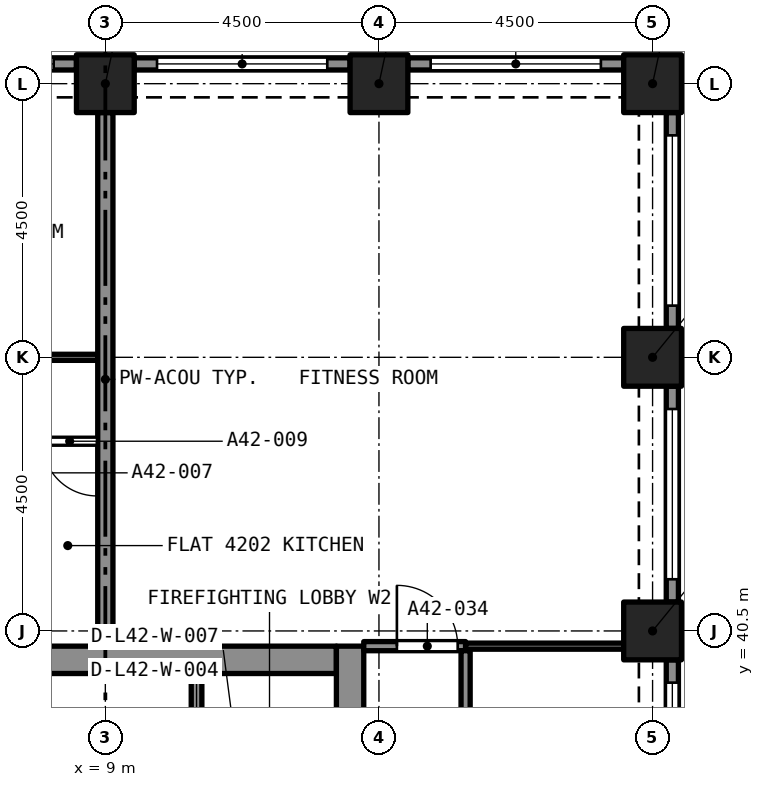
"""IFC4 building model, lengths in metres.
Left out: names, types, materials, properties, quantities, classifications, styles, units other than length and angle.
Written with IfcOpenShell. Run it as: python <this file> out.ifc"""

import sys

from ifc_helpers import new_model, si_unit, direction, frame, frame_2d, origin, origin_2d, place, context, subcontext, project, spatial, rectangle, extrude, element, fill, save


model = new_model("IFC4")
c1 = context("Model", 3, precision=1e-05, world=origin(), true_north=direction((0.0, 1.0)))
c2 = subcontext(c1, "Body", "Model", "MODEL_VIEW")
j1 = project(units=[si_unit("LENGTHUNIT", "METRE"), si_unit("PLANEANGLEUNIT", "RADIAN")], contexts=[c1])
p1 = place(None, origin())
s1 = spatial("IfcSite", under=j1, at=p1, CompositionType="ELEMENT")
p2 = place(p1, origin())
s2 = spatial("IfcBuilding", under=s1, at=p2, CompositionType="ELEMENT")
p3 = place(p2, frame((0.0, 0.0, 150.6)))
s3 = spatial("IfcBuildingStorey", under=s2, at=p3, CompositionType="ELEMENT", Elevation=150.6)
for number, where, z_axis, x_axis in (
    (1, (18.0, 40.5, 0.0), (0.0, 0.0, 1.0), (1.0, 0.0, 0.0)),
    (2, (18.0, 45.0, 0.0), (0.0, 0.0, 1.0), (1.0, 0.0, 0.0)),
    (3, (9.0, 49.5, 0.0), (0.0, 0.0, 1.0), (1.0, 0.0, 0.0)),
    (4, (13.5, 49.5, 0.0), (0.0, 0.0, 1.0), (1.0, 0.0, 0.0)),
    (5, (18.0, 49.5, 0.0), (0.0, 0.0, 1.0), (1.0, 0.0, 0.0)),
):
    element("IfcColumn", number, at=place(p3, frame(where, z_axis=z_axis, x_axis=x_axis)), inside=s3, PredefinedType="COLUMN", context=c2, shape_type="SweptSolid", body=[
        extrude(rectangle(XDim=0.95, YDim=0.95, at=origin_2d()), origin(), (0.0, 0.0, 1.0), 4.4),
    ])
p4 = place(p3, frame((5.2, 40.025, 0.0), z_axis=(0.0, 0.0, 1.0), x_axis=(1.0, 0.0, 0.0)))
e6 = element("IfcWall", 6, at=p4, inside=s3, PredefinedType="SOLIDWALL", context=c2, shape_type="SweptSolid", body=[
    extrude(rectangle(XDim=7.6, YDim=0.45, at=frame_2d((3.8, 0.0))), origin(), (0.0, 0.0, 1.0), 4.4),
])
p5 = place(p3, frame((13.025, 27.25, 0.0), z_axis=(0.0, 0.0, 1.0), x_axis=(0.0, 1.0, 0.0)))
e7 = element("IfcWall", 7, at=p5, inside=s3, PredefinedType="SOLIDWALL", context=c2, shape_type="SweptSolid", body=[
    extrude(rectangle(XDim=13.0, YDim=0.45, at=frame_2d((6.5, 0.0))), origin(), (0.0, 0.0, 1.0), 4.4),
])
p6 = place(p5, frame((10.85, 0.0, 0.0)))
e8 = element("IfcOpeningElement", 8, at=p6, cuts=e7, PredefinedType="OPENING", context=c2, shape_type="SweptSolid", body=[
    extrude(rectangle(XDim=1.1, YDim=2.1, at=frame_2d((0.55, 1.05))), frame((0.0, 0.235, 0.0), z_axis=(0.0, -1.0, 0.0), x_axis=(1.0, 0.0, 0.0)), (0.0, 0.0, 1.0), 0.47),
])
p7 = place(p5, frame((8.7, 0.0, 0.0)))
e9 = element("IfcOpeningElement", 9, at=p7, cuts=e7, PredefinedType="OPENING", context=c2, shape_type="SweptSolid", body=[
    extrude(rectangle(XDim=1.2, YDim=2.1, at=frame_2d((0.6, 1.05))), frame((0.0, 0.235, 0.0), z_axis=(0.0, -1.0, 0.0), x_axis=(1.0, 0.0, 0.0)), (0.0, 0.0, 1.0), 0.47),
])
p8 = place(p3, frame((13.975, 49.825, 0.0), z_axis=(0.0, 0.0, 1.0), x_axis=(1.0, 0.0, 0.0)))
e10 = element("IfcWall", 10, at=p8, inside=s3, PredefinedType="SOLIDWALL", context=c2, shape_type="SweptSolid", body=[
    extrude(rectangle(XDim=3.55, YDim=0.2, at=frame_2d((1.775, 0.0))), origin(), (0.0, 0.0, 1.0), 4.4),
])
p9 = place(p8, frame((0.375, 0.0, 0.45)))
e11 = element("IfcOpeningElement", 11, at=p9, cuts=e10, PredefinedType="OPENING", context=c2, shape_type="SweptSolid", body=[
    extrude(rectangle(XDim=2.8, YDim=2.55, at=frame_2d((1.4, 1.275))), frame((0.0, 0.11, 0.0), z_axis=(0.0, -1.0, 0.0), x_axis=(1.0, 0.0, 0.0)), (0.0, 0.0, 1.0), 0.22),
])
p10 = place(p3, frame((9.475, 49.825, 0.0), z_axis=(0.0, 0.0, 1.0), x_axis=(1.0, 0.0, 0.0)))
e12 = element("IfcWall", 12, at=p10, inside=s3, PredefinedType="SOLIDWALL", context=c2, shape_type="SweptSolid", body=[
    extrude(rectangle(XDim=3.55, YDim=0.2, at=frame_2d((1.775, 0.0))), origin(), (0.0, 0.0, 1.0), 4.4),
])
p11 = place(p10, frame((0.375, 0.0, 0.45)))
e13 = element("IfcOpeningElement", 13, at=p11, cuts=e12, PredefinedType="OPENING", context=c2, shape_type="SweptSolid", body=[
    extrude(rectangle(XDim=2.8, YDim=2.55, at=frame_2d((1.4, 1.275))), frame((0.0, 0.11, 0.0), z_axis=(0.0, -1.0, 0.0), x_axis=(1.0, 0.0, 0.0)), (0.0, 0.0, 1.0), 0.22),
])
p12 = place(p3, frame((4.975, 49.825, 0.0), z_axis=(0.0, 0.0, 1.0), x_axis=(1.0, 0.0, 0.0)))
e14 = element("IfcWall", 14, at=p12, inside=s3, PredefinedType="SOLIDWALL", context=c2, shape_type="SweptSolid", body=[
    extrude(rectangle(XDim=3.55, YDim=0.2, at=frame_2d((1.775, 0.0))), origin(), (0.0, 0.0, 1.0), 4.4),
])
p13 = place(p12, frame((0.375, 0.0, 0.45)))
e15 = element("IfcOpeningElement", 15, at=p13, cuts=e14, PredefinedType="OPENING", context=c2, shape_type="SweptSolid", body=[
    extrude(rectangle(XDim=2.8, YDim=2.55, at=frame_2d((1.4, 1.275))), frame((0.0, 0.11, 0.0), z_axis=(0.0, -1.0, 0.0), x_axis=(1.0, 0.0, 0.0)), (0.0, 0.0, 1.0), 0.22),
])
p14 = place(p3, frame((18.325, 40.025, 0.0), z_axis=(0.0, 0.0, 1.0), x_axis=(0.0, -1.0, 0.0)))
e16 = element("IfcWall", 16, at=p14, inside=s3, PredefinedType="SOLIDWALL", context=c2, shape_type="SweptSolid", body=[
    extrude(rectangle(XDim=3.55, YDim=0.2, at=frame_2d((1.775, 0.0))), origin(), (0.0, 0.0, 1.0), 4.4),
])
p15 = place(p14, frame((0.375, 0.0, 0.45)))
e17 = element("IfcOpeningElement", 17, at=p15, cuts=e16, PredefinedType="OPENING", context=c2, shape_type="SweptSolid", body=[
    extrude(rectangle(XDim=2.8, YDim=2.55, at=frame_2d((1.4, 1.275))), frame((0.0, 0.11, 0.0), z_axis=(0.0, -1.0, 0.0), x_axis=(1.0, 0.0, 0.0)), (0.0, 0.0, 1.0), 0.22),
])
p16 = place(p3, frame((18.325, 44.525, 0.0), z_axis=(0.0, 0.0, 1.0), x_axis=(0.0, -1.0, 0.0)))
e18 = element("IfcWall", 18, at=p16, inside=s3, PredefinedType="SOLIDWALL", context=c2, shape_type="SweptSolid", body=[
    extrude(rectangle(XDim=3.55, YDim=0.2, at=frame_2d((1.775, 0.0))), origin(), (0.0, 0.0, 1.0), 4.4),
])
p17 = place(p16, frame((0.375, 0.0, 0.45)))
e19 = element("IfcOpeningElement", 19, at=p17, cuts=e18, PredefinedType="OPENING", context=c2, shape_type="SweptSolid", body=[
    extrude(rectangle(XDim=2.8, YDim=2.55, at=frame_2d((1.4, 1.275))), frame((0.0, 0.11, 0.0), z_axis=(0.0, -1.0, 0.0), x_axis=(1.0, 0.0, 0.0)), (0.0, 0.0, 1.0), 0.22),
])
p18 = place(p3, frame((18.325, 49.025, 0.0), z_axis=(0.0, 0.0, 1.0), x_axis=(0.0, -1.0, 0.0)))
e20 = element("IfcWall", 20, at=p18, inside=s3, PredefinedType="SOLIDWALL", context=c2, shape_type="SweptSolid", body=[
    extrude(rectangle(XDim=3.55, YDim=0.2, at=frame_2d((1.775, 0.0))), origin(), (0.0, 0.0, 1.0), 4.4),
])
p19 = place(p18, frame((0.375, 0.0, 0.45)))
e21 = element("IfcOpeningElement", 21, at=p19, cuts=e20, PredefinedType="OPENING", context=c2, shape_type="SweptSolid", body=[
    extrude(rectangle(XDim=2.8, YDim=2.55, at=frame_2d((1.4, 1.275))), frame((0.0, 0.11, 0.0), z_axis=(0.0, -1.0, 0.0), x_axis=(1.0, 0.0, 0.0)), (0.0, 0.0, 1.0), 0.22),
])
p20 = place(p3, frame((4.5, 45.0, 0.0), z_axis=(0.0, 0.0, 1.0), x_axis=(1.0, 0.0, 0.0)))
e22 = element("IfcWall", 22, at=p20, inside=s3, PredefinedType="PARTITIONING", context=c2, shape_type="SweptSolid", body=[
    extrude(rectangle(XDim=4.375, YDim=0.1, at=frame_2d((2.188, 0.0))), origin(), (0.0, 0.0, 1.0), 4.1),
])
p21 = place(p20, frame((1.8, 0.0, 0.0)))
e23 = element("IfcOpeningElement", 23, at=p21, cuts=e22, PredefinedType="OPENING", context=c2, shape_type="SweptSolid", body=[
    extrude(rectangle(XDim=0.9, YDim=2.1, at=frame_2d((0.45, 1.05))), frame((0.0, 0.06, 0.0), z_axis=(0.0, -1.0, 0.0), x_axis=(1.0, 0.0, 0.0)), (0.0, 0.0, 1.0), 0.12),
])
p22 = place(p3, frame((8.875, 43.62, 0.0), z_axis=(0.0, 0.0, 1.0), x_axis=(-1.0, 0.0, 0.0)))
e24 = element("IfcWall", 24, at=p22, inside=s3, PredefinedType="PARTITIONING", context=c2, shape_type="SweptSolid", body=[
    extrude(rectangle(XDim=1.048, YDim=0.1, at=frame_2d((0.524, 0.0))), origin(), (0.0, 0.0, 1.0), 4.1),
])
p23 = place(p22, frame((0.011, 0.0, 0.0)))
e25 = element("IfcOpeningElement", 25, at=p23, cuts=e24, PredefinedType="OPENING", context=c2, shape_type="SweptSolid", body=[
    extrude(rectangle(XDim=0.9, YDim=2.1, at=frame_2d((0.45, 1.05))), frame((0.0, 0.06, 0.0), z_axis=(0.0, -1.0, 0.0), x_axis=(1.0, 0.0, 0.0)), (0.0, 0.0, 1.0), 0.12),
])
p24 = place(p3, frame((9.0, 40.25, 0.0), z_axis=(0.0, 0.0, 1.0), x_axis=(0.0, 1.0, 0.0)))
e26 = element("IfcWall", 26, at=p24, inside=s3, PredefinedType="PARTITIONING", context=c2, shape_type="SweptSolid", body=[
    extrude(rectangle(XDim=8.775, YDim=0.25, at=frame_2d((4.387, 0.0))), origin(), (0.0, 0.0, 1.0), 4.1),
])
p25 = place(p3, frame((13.25, 40.25, 0.0), z_axis=(0.0, 0.0, 1.0), x_axis=(1.0, 0.0, 0.0)))
e27 = element("IfcWall", 27, at=p25, inside=s3, PredefinedType="PARTITIONING", context=c2, shape_type="SweptSolid", body=[
    extrude(rectangle(XDim=1.675, YDim=0.15, at=frame_2d((0.837, 0.0))), origin(), (0.0, 0.0, 1.0), 4.1),
])
p26 = place(p25, frame((0.545, 0.0, 0.0)))
e28 = element("IfcOpeningElement", 28, at=p26, cuts=e27, PredefinedType="OPENING", context=c2, shape_type="SweptSolid", body=[
    extrude(rectangle(XDim=1.0, YDim=2.1, at=frame_2d((0.5, 1.05))), frame((0.0, 0.085, 0.0), z_axis=(0.0, -1.0, 0.0), x_axis=(1.0, 0.0, 0.0)), (0.0, 0.0, 1.0), 0.17),
])
p27 = place(p3, frame((14.925, 40.25, 0.0), z_axis=(0.0, 0.0, 1.0), x_axis=(1.0, 0.0, 0.0)))
e29 = element("IfcWall", 29, at=p27, inside=s3, PredefinedType="PARTITIONING", context=c2, shape_type="SweptSolid", body=[
    extrude(rectangle(XDim=2.6, YDim=0.1, at=frame_2d((1.3, 0.0))), origin(), (0.0, 0.0, 1.0), 4.1),
])
p28 = place(p3, frame((14.925, 40.175, 0.0), z_axis=(0.0, 0.0, 1.0), x_axis=(0.0, -1.0, 0.0)))
e30 = element("IfcWall", 30, at=p28, inside=s3, PredefinedType="PARTITIONING", context=c2, shape_type="SweptSolid", body=[
    extrude(rectangle(XDim=8.675, YDim=0.15, at=frame_2d((4.337, 0.0))), origin(), (0.0, 0.0, 1.0), 4.1),
])
p29 = place(p28, frame((3.8, 0.0, 0.0)))
e31 = element("IfcOpeningElement", 31, at=p29, cuts=e30, PredefinedType="OPENING", context=c2, shape_type="SweptSolid", body=[
    extrude(rectangle(XDim=1.0, YDim=2.1, at=frame_2d((0.5, 1.05))), frame((0.0, 0.085, 0.0), z_axis=(0.0, -1.0, 0.0), x_axis=(1.0, 0.0, 0.0)), (0.0, 0.0, 1.0), 0.17),
])
p30 = place(p3, frame((10.5, 37.5, 0.0), z_axis=(0.0, 0.0, 1.0), x_axis=(0.0, 1.0, 0.0)))
e32 = element("IfcWall", 32, at=p30, inside=s3, PredefinedType="SOLIDWALL", context=c2, shape_type="SweptSolid", body=[
    extrude(rectangle(XDim=2.3, YDim=0.175, at=frame_2d((1.15, 0.0))), origin(), (0.0, 0.0, 1.0), 4.1),
])
p31 = place(p30, frame((0.65, 0.0, 0.0)))
e33 = element("IfcOpeningElement", 33, at=p31, cuts=e32, PredefinedType="OPENING", context=c2, shape_type="SweptSolid", body=[
    extrude(rectangle(XDim=1.0, YDim=2.1, at=frame_2d((0.5, 1.05))), frame((0.0, 0.097, 0.0), z_axis=(0.0, -1.0, 0.0), x_axis=(1.0, 0.0, 0.0)), (0.0, 0.0, 1.0), 0.195),
])
p32 = place(p9, origin())
e34 = element("IfcWindow", 34, at=p32, inside=s3, PartitioningType="SINGLE_PANEL", PredefinedType="WINDOW", context=c2, shape_type="SweptSolid", body=[
    extrude(rectangle(XDim=2.8, YDim=2.55, at=frame_2d((1.4, 1.275))), frame((0.0, 0.03, 0.0), z_axis=(0.0, -1.0, 0.0), x_axis=(1.0, 0.0, 0.0)), (0.0, 0.0, 1.0), 0.06),
])
fill(e11, e34)
p33 = place(p11, origin())
e35 = element("IfcWindow", 35, at=p33, inside=s3, PartitioningType="SINGLE_PANEL", PredefinedType="WINDOW", context=c2, shape_type="SweptSolid", body=[
    extrude(rectangle(XDim=2.8, YDim=2.55, at=frame_2d((1.4, 1.275))), frame((0.0, 0.03, 0.0), z_axis=(0.0, -1.0, 0.0), x_axis=(1.0, 0.0, 0.0)), (0.0, 0.0, 1.0), 0.06),
])
fill(e13, e35)
p34 = place(p13, origin())
e36 = element("IfcWindow", 36, at=p34, inside=s3, PartitioningType="SINGLE_PANEL", PredefinedType="WINDOW", context=c2, shape_type="SweptSolid", body=[
    extrude(rectangle(XDim=2.8, YDim=2.55, at=frame_2d((1.4, 1.275))), frame((0.0, 0.03, 0.0), z_axis=(0.0, -1.0, 0.0), x_axis=(1.0, 0.0, 0.0)), (0.0, 0.0, 1.0), 0.06),
])
fill(e15, e36)
p35 = place(p15, origin())
e37 = element("IfcWindow", 37, at=p35, inside=s3, PartitioningType="SINGLE_PANEL", PredefinedType="WINDOW", context=c2, shape_type="SweptSolid", body=[
    extrude(rectangle(XDim=2.8, YDim=2.55, at=frame_2d((1.4, 1.275))), frame((0.0, 0.03, 0.0), z_axis=(0.0, -1.0, 0.0), x_axis=(1.0, 0.0, 0.0)), (0.0, 0.0, 1.0), 0.06),
])
fill(e17, e37)
p36 = place(p17, origin())
e38 = element("IfcWindow", 38, at=p36, inside=s3, PartitioningType="SINGLE_PANEL", PredefinedType="WINDOW", context=c2, shape_type="SweptSolid", body=[
    extrude(rectangle(XDim=2.8, YDim=2.55, at=frame_2d((1.4, 1.275))), frame((0.0, 0.03, 0.0), z_axis=(0.0, -1.0, 0.0), x_axis=(1.0, 0.0, 0.0)), (0.0, 0.0, 1.0), 0.06),
])
fill(e19, e38)
p37 = place(p19, origin())
e39 = element("IfcWindow", 39, at=p37, inside=s3, PartitioningType="SINGLE_PANEL", PredefinedType="WINDOW", context=c2, shape_type="SweptSolid", body=[
    extrude(rectangle(XDim=2.8, YDim=2.55, at=frame_2d((1.4, 1.275))), frame((0.0, 0.03, 0.0), z_axis=(0.0, -1.0, 0.0), x_axis=(1.0, 0.0, 0.0)), (0.0, 0.0, 1.0), 0.06),
])
fill(e21, e39)
p38 = place(p23, origin())
e40 = element("IfcDoor", 40, at=p38, inside=s3, OperationType="SINGLE_SWING_LEFT", PredefinedType="DOOR", context=c2, shape_type="SweptSolid", body=[
    extrude(rectangle(XDim=0.9, YDim=2.1, at=frame_2d((0.45, 1.05))), frame((0.0, 0.025, 0.0), z_axis=(0.0, -1.0, 0.0), x_axis=(1.0, 0.0, 0.0)), (0.0, 0.0, 1.0), 0.05),
])
fill(e25, e40)
p39 = place(p26, origin())
e41 = element("IfcDoor", 41, at=p39, inside=s3, OperationType="SINGLE_SWING_RIGHT", PredefinedType="DOOR", context=c2, shape_type="SweptSolid", body=[
    extrude(rectangle(XDim=1.0, YDim=2.1, at=frame_2d((0.5, 1.05))), frame((0.0, 0.025, 0.0), z_axis=(0.0, -1.0, 0.0), x_axis=(1.0, 0.0, 0.0)), (0.0, 0.0, 1.0), 0.05),
])
fill(e28, e41)
save(model, sys.argv[1])
